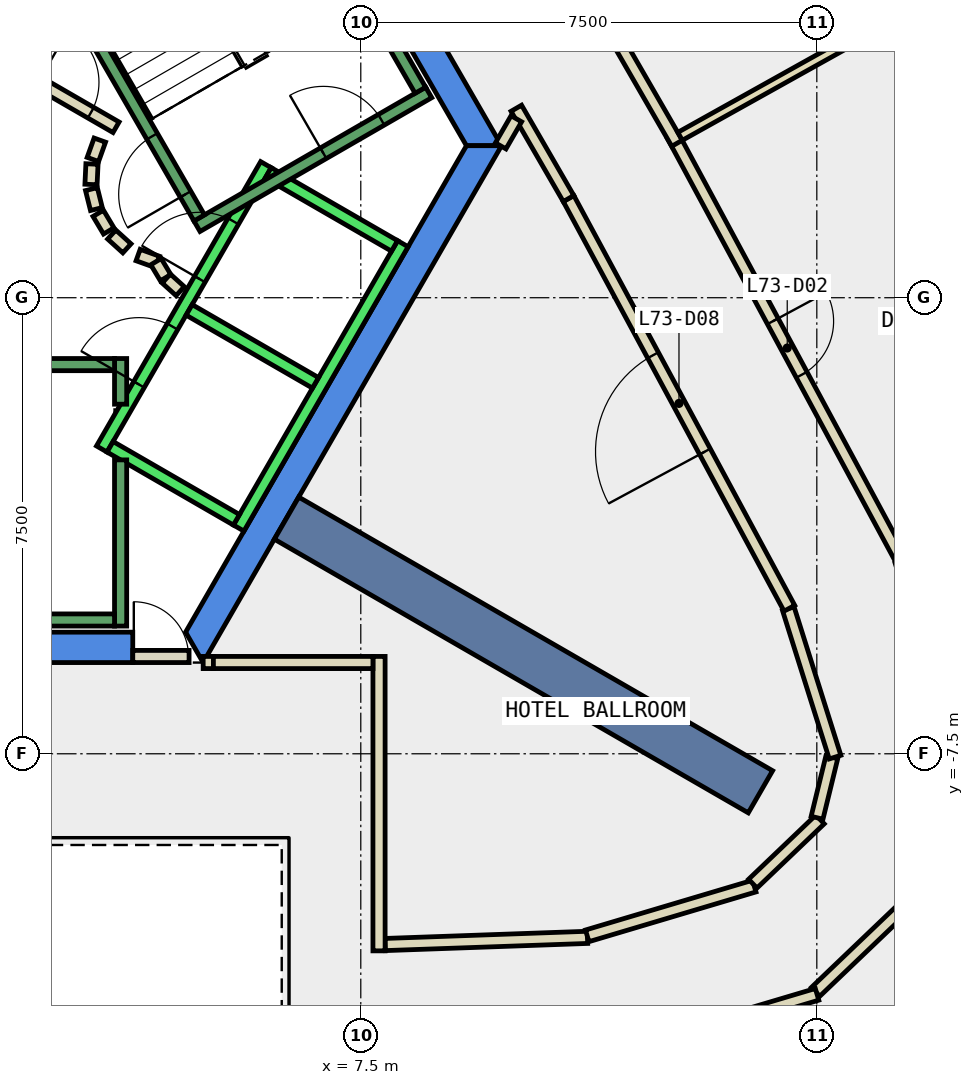
"""IFC4 building model, lengths in metres.
Left out: names, types, materials, properties, quantities, classifications, styles, units other than length and angle.
Written with IfcOpenShell. Run it as: python <this file> out.ifc"""

import sys

from ifc_helpers import new_model, si_unit, direction, frame, frame_2d, origin, place, context, subcontext, project, spatial, polyline, rectangle, outline, extrude, element, fill, save


model = new_model("IFC4")
c1 = context("Model", 3, precision=1e-05, world=origin(), true_north=direction((0.0, 1.0)))
c2 = subcontext(c1, "Body", "Model", "MODEL_VIEW")
j1 = project(units=[si_unit("LENGTHUNIT", "METRE"), si_unit("PLANEANGLEUNIT", "RADIAN")], contexts=[c1])
p1 = place(None, origin())
s1 = spatial("IfcSite", under=j1, at=p1, CompositionType="ELEMENT")
p2 = place(p1, origin())
s2 = spatial("IfcBuilding", under=s1, at=p2, CompositionType="ELEMENT")
p3 = place(p2, frame((0.0, 0.0, 311.6)))
s3 = spatial("IfcBuildingStorey", under=s2, at=p3, CompositionType="ELEMENT", Elevation=311.6)
p4 = place(p3, frame((0.0, 0.0, -0.34)))
e1 = element("IfcWall", 1, at=p4, inside=s3, PredefinedType="SHEAR", context=c2, shape_type="SweptSolid", body=[
    extrude(outline(polyline([(5.486, 9.998), (5.053, 9.748), (9.238, 2.5), (9.815, 2.5), (5.486, 9.998)])), origin(), (0.0, 0.0, 1.0), 3.6),
])
p5 = place(p3, frame((0.0, 0.0, -0.34)))
e2 = element("IfcWall", 2, at=p5, inside=s3, PredefinedType="SHEAR", context=c2, shape_type="SweptSolid", body=[
    extrude(outline(polyline([(3.75, -6.0), (3.75, -5.5), (-4.619, -5.5), (-4.907, -6.0), (3.75, -6.0)])), origin(), (0.0, 0.0, 1.0), 3.6),
])
p6 = place(p3, frame((0.0, 0.0, -0.34)))
e3 = element("IfcWall", 3, at=p6, inside=s3, PredefinedType="SHEAR", context=c2, shape_type="SweptSolid", body=[
    extrude(outline(polyline([(4.907, -6.0), (9.815, 2.5), (9.238, 2.5), (4.619, -5.5), (4.907, -6.0)])), origin(), (0.0, 0.0, 1.0), 3.6),
])
p7 = place(p3, frame((6.279, -3.625, -0.34), z_axis=(0.0, 0.0, 1.0), x_axis=(0.866017533419, -0.500013631625, 0.0)))
e4 = element("IfcWall", 4, at=p7, inside=s3, PredefinedType="SHEAR", context=c2, shape_type="SweptSolid", body=[
    extrude(rectangle(XDim=9.0, YDim=0.8, at=frame_2d((4.5, 0.0))), origin(), (0.0, 0.0, 1.0), 3.6),
])
p8 = place(p3, frame((7.9, -10.637, 0.0), z_axis=(0.0, 0.0, 1.0), x_axis=(0.999372900517, 0.035409119054, 0.0)))
e5 = element("IfcWall", 5, at=p8, inside=s3, PredefinedType="PARTITIONING", context=c2, shape_type="SweptSolid", body=[
    extrude(rectangle(XDim=3.33, YDim=0.2, at=frame_2d((1.665, 0.0))), origin(), (0.0, 0.0, 1.0), 3.26),
])
p9 = place(p3, frame((11.224, -10.494, 0.0), z_axis=(0.0, 0.0, 1.0), x_axis=(0.958417413979, 0.285370041492, 0.0)))
e6 = element("IfcWall", 6, at=p9, inside=s3, PredefinedType="PARTITIONING", context=c2, shape_type="SweptSolid", body=[
    extrude(rectangle(XDim=2.866, YDim=0.2, at=frame_2d((1.433, 0.0))), origin(), (0.0, 0.0, 1.0), 3.26),
])
p10 = place(p3, frame((13.947, -9.636, 0.0), z_axis=(0.0, 0.0, 1.0), x_axis=(0.723283043556, 0.690551691696, 0.0)))
e7 = element("IfcWall", 7, at=p10, inside=s3, PredefinedType="PARTITIONING", context=c2, shape_type="SweptSolid", body=[
    extrude(rectangle(XDim=1.529, YDim=0.2, at=frame_2d((0.765, 0.0))), origin(), (0.0, 0.0, 1.0), 3.26),
])
p11 = place(p3, frame((15.004, -8.552, 0.0), z_axis=(0.0, 0.0, 1.0), x_axis=(0.237373129266, 0.971418549083, 0.0)))
e8 = element("IfcWall", 8, at=p11, inside=s3, PredefinedType="PARTITIONING", context=c2, shape_type="SweptSolid", body=[
    extrude(rectangle(XDim=1.024, YDim=0.2, at=frame_2d((0.512, 0.0))), origin(), (0.0, 0.0, 1.0), 3.26),
])
p12 = place(p3, frame((15.3, -7.555, 0.0), z_axis=(0.0, 0.0, 1.0), x_axis=(-0.300501248013, 0.953781421471, 0.0)))
e9 = element("IfcWall", 9, at=p12, inside=s3, PredefinedType="PARTITIONING", context=c2, shape_type="SweptSolid", body=[
    extrude(rectangle(XDim=2.559, YDim=0.2, at=frame_2d((1.28, 0.0))), origin(), (0.0, 0.0, 1.0), 3.26),
])
p13 = place(p3, frame((14.549, -5.107, 0.0), z_axis=(0.0, 0.0, 1.0), x_axis=(-0.47449538478, 0.880257990491, 0.0)))
e10 = element("IfcWall", 10, at=p13, inside=s3, PredefinedType="PARTITIONING", context=c2, shape_type="SweptSolid", body=[
    extrude(rectangle(XDim=7.655, YDim=0.2, at=frame_2d((3.827, 0.0))), origin(), (0.0, 0.0, 1.0), 3.26),
])
p14 = place(p13, frame((2.927, 0.0, 0.0)))
e11 = element("IfcOpeningElement", 11, at=p14, cuts=e10, PredefinedType="OPENING", context=c2, shape_type="SweptSolid", body=[
    extrude(rectangle(XDim=1.8, YDim=2.1, at=frame_2d((0.9, 1.05))), frame((0.0, 0.11, 0.0), z_axis=(0.0, -1.0, 0.0), x_axis=(1.0, 0.0, 0.0)), (0.0, 0.0, 1.0), 0.22),
])
p15 = place(p3, frame((10.917, 1.631, 0.0), z_axis=(0.0, 0.0, 1.0), x_axis=(-0.500699613169, 0.865621104972, 0.0)))
e12 = element("IfcWall", 12, at=p15, inside=s3, PredefinedType="PARTITIONING", context=c2, shape_type="SweptSolid", body=[
    extrude(rectangle(XDim=1.715, YDim=0.2, at=frame_2d((0.858, 0.0))), origin(), (0.0, 0.0, 1.0), 3.26),
])
p16 = place(p3, frame((10.058, 2.943, 0.0), z_axis=(0.0, 0.0, 1.0), x_axis=(-0.499352927503, -0.866398669086, 0.0)))
e13 = element("IfcWall", 13, at=p16, inside=s3, PredefinedType="PARTITIONING", context=c2, shape_type="SweptSolid", body=[
    extrude(rectangle(XDim=0.515, YDim=0.2, at=frame_2d((0.257, 0.0))), origin(), (0.0, 0.0, 1.0), 3.26),
])
p17 = place(p3, frame((12.628, 2.671, 0.0), z_axis=(0.0, 0.0, 1.0), x_axis=(0.474489967676, -0.880260910512, 0.0)))
e14 = element("IfcWall", 14, at=p17, inside=s3, PredefinedType="PARTITIONING", context=c2, shape_type="SweptSolid", body=[
    extrude(rectangle(XDim=7.948, YDim=0.2, at=frame_2d((3.974, 0.0))), origin(), (0.0, 0.0, 1.0), 3.26),
])
p18 = place(p17, frame((3.474, 0.0, 0.0)))
e15 = element("IfcOpeningElement", 15, at=p18, cuts=e14, PredefinedType="OPENING", context=c2, shape_type="SweptSolid", body=[
    extrude(rectangle(XDim=1.0, YDim=2.1, at=frame_2d((0.5, 1.05))), frame((0.0, 0.11, 0.0), z_axis=(0.0, -1.0, 0.0), x_axis=(1.0, 0.0, 0.0)), (0.0, 0.0, 1.0), 0.22),
])
p19 = place(p3, frame((16.857, -9.622, 0.0), z_axis=(0.0, 0.0, 1.0), x_axis=(-0.723099256445, -0.690744138831, 0.0)))
e16 = element("IfcWall", 16, at=p19, inside=s3, PredefinedType="PARTITIONING", context=c2, shape_type="SweptSolid", body=[
    extrude(rectangle(XDim=2.596, YDim=0.2, at=frame_2d((1.298, 0.0))), origin(), (0.0, 0.0, 1.0), 3.26),
])
p20 = place(p3, frame((15.004, -11.456, 0.0), z_axis=(0.0, 0.0, 1.0), x_axis=(-0.958459796003, -0.285227662485, 0.0)))
e17 = element("IfcWall", 17, at=p20, inside=s3, PredefinedType="PARTITIONING", context=c2, shape_type="SweptSolid", body=[
    extrude(rectangle(XDim=3.604, YDim=0.2, at=frame_2d((1.802, 0.0))), origin(), (0.0, 0.0, 1.0), 3.26),
])
p21 = place(p3, frame((8.588, 9.665, 0.0), z_axis=(0.0, 0.0, 1.0), x_axis=(0.499946799636, -0.86605611685, 0.0)))
e18 = element("IfcWall", 18, at=p21, inside=s3, PredefinedType="PARTITIONING", context=c2, shape_type="SweptSolid", body=[
    extrude(rectangle(XDim=8.227, YDim=0.2, at=frame_2d((4.114, 0.0))), origin(), (0.0, 0.0, 1.0), 3.26),
])
p22 = place(p21, frame((3.613, 0.0, 0.0)))
e19 = element("IfcOpeningElement", 19, at=p22, cuts=e18, PredefinedType="OPENING", context=c2, shape_type="SweptSolid", body=[
    extrude(rectangle(XDim=1.0, YDim=2.1, at=frame_2d((0.5, 1.05))), frame((0.0, 0.11, 0.0), z_axis=(0.0, -1.0, 0.0), x_axis=(1.0, 0.0, 0.0)), (0.0, 0.0, 1.0), 0.22),
])
p23 = place(p3, frame((1.866, 3.732, 0.0), z_axis=(0.0, 0.0, 1.0), x_axis=(0.866043361281, -0.499968895414, 0.0)))
e20 = element("IfcWall", 20, at=p23, inside=s3, PredefinedType="PARTITIONING", context=c2, shape_type="SweptSolid", body=[
    extrude(rectangle(XDim=1.858, YDim=0.2, at=frame_2d((0.929, 0.0))), origin(), (0.0, 0.0, 1.0), 3.26),
])
p24 = place(p23, frame((0.379, 0.0, 0.0)))
e21 = element("IfcOpeningElement", 21, at=p24, cuts=e20, PredefinedType="OPENING", context=c2, shape_type="SweptSolid", body=[
    extrude(rectangle(XDim=1.0, YDim=2.1, at=frame_2d((0.5, 1.05))), frame((0.0, 0.11, 0.0), z_axis=(0.0, -1.0, 0.0), x_axis=(1.0, 0.0, 0.0)), (0.0, 0.0, 1.0), 0.22),
])
p25 = place(p3, frame((3.208, 2.592, 0.0), z_axis=(0.0, 0.0, 1.0), x_axis=(-0.337388820924, -0.941365382578, 0.0)))
e22 = element("IfcWall", 22, at=p25, inside=s3, PredefinedType="PARTITIONING", context=c2, shape_type="SweptSolid", body=[
    extrude(rectangle(XDim=0.338, YDim=0.2, at=frame_2d((0.169, 0.0))), origin(), (0.0, 0.0, 1.0), 3.26),
])
p26 = place(p3, frame((3.079, 2.199, 0.0), z_axis=(0.0, 0.0, 1.0), x_axis=(-0.047771483479, -0.998858290933, 0.0)))
e23 = element("IfcWall", 23, at=p26, inside=s3, PredefinedType="PARTITIONING", context=c2, shape_type="SweptSolid", body=[
    extrude(rectangle(XDim=0.337, YDim=0.2, at=frame_2d((0.169, 0.0))), origin(), (0.0, 0.0, 1.0), 3.26),
])
p27 = place(p3, frame((3.07, 1.786, 0.0), z_axis=(0.0, 0.0, 1.0), x_axis=(0.242705583207, -0.970099994784, 0.0)))
e24 = element("IfcWall", 24, at=p27, inside=s3, PredefinedType="PARTITIONING", context=c2, shape_type="SweptSolid", body=[
    extrude(rectangle(XDim=0.338, YDim=0.2, at=frame_2d((0.169, 0.0))), origin(), (0.0, 0.0, 1.0), 3.26),
])
for number, where, z_axis, x_axis in (
    (25, (3.182, 1.388, 0.0), (0.0, 0.0, 1.0), (0.512, -0.859, 0.0)),
    (26, (3.404, 1.039, 0.0), (0.0, 0.0, 1.0), (0.74, -0.672, 0.0)),
):
    element("IfcWall", number, at=place(p3, frame(where, z_axis=z_axis, x_axis=x_axis)), inside=s3, PredefinedType="PARTITIONING", context=c2, shape_type="SweptSolid", body=[
        extrude(rectangle(XDim=0.338, YDim=0.2, at=frame_2d((0.169, 0.0))), origin(), (0.0, 0.0, 1.0), 3.26),
    ])
p28 = place(p3, frame((3.838, 0.702, 0.0), z_axis=(0.0, 0.0, 1.0), x_axis=(0.941035081519, -0.338308993895, 0.0)))
e27 = element("IfcWall", 27, at=p28, inside=s3, PredefinedType="PARTITIONING", context=c2, shape_type="SweptSolid", body=[
    extrude(rectangle(XDim=0.337, YDim=0.2, at=frame_2d((0.168, 0.0))), origin(), (0.0, 0.0, 1.0), 3.26),
])
p29 = place(p3, frame((4.132, 0.593, 0.0), z_axis=(0.0, 0.0, 1.0), x_axis=(0.513561617048, -0.858052717201, 0.0)))
e28 = element("IfcWall", 28, at=p29, inside=s3, PredefinedType="PARTITIONING", context=c2, shape_type="SweptSolid", body=[
    extrude(rectangle(XDim=0.308, YDim=0.2, at=frame_2d((0.154, 0.0))), origin(), (0.0, 0.0, 1.0), 3.26),
])
p30 = place(p3, frame((4.301, 0.315, 0.0), z_axis=(0.0, 0.0, 1.0), x_axis=(0.741798017506, -0.670623367639, 0.0)))
e29 = element("IfcWall", 29, at=p30, inside=s3, PredefinedType="PARTITIONING", context=c2, shape_type="SweptSolid", body=[
    extrude(rectangle(XDim=0.309, YDim=0.2, at=frame_2d((0.154, 0.0))), origin(), (0.0, 0.0, 1.0), 3.26),
])
p31 = place(p3, frame((4.908, -5.999, 0.0), z_axis=(0.0, 0.0, 1.0), x_axis=(1.0, 0.0, 0.0)))
e30 = element("IfcWall", 30, at=p31, inside=s3, PredefinedType="PARTITIONING", context=c2, shape_type="SweptSolid", body=[
    extrude(rectangle(XDim=0.168, YDim=0.2, at=frame_2d((0.084, 0.0))), origin(), (0.0, 0.0, 1.0), 2.4),
])
p32 = place(p3, frame((7.8, -5.899, 0.0), z_axis=(0.0, 0.0, 1.0), x_axis=(0.0, -1.0, 0.0)))
e31 = element("IfcWall", 31, at=p32, inside=s3, PredefinedType="PARTITIONING", context=c2, shape_type="SweptSolid", body=[
    extrude(rectangle(XDim=4.842, YDim=0.2, at=frame_2d((2.421, 0.0))), origin(), (0.0, 0.0, 1.0), 3.26),
])
p33 = place(p3, frame((12.751, 2.654, 0.0), z_axis=(0.0, 0.0, 1.0), x_axis=(0.873277679945, 0.487222837837, 0.0)))
e32 = element("IfcWall", 32, at=p33, inside=s3, PredefinedType="PARTITIONING", context=c2, shape_type="SweptSolid", body=[
    extrude(rectangle(XDim=4.38, YDim=0.15, at=frame_2d((2.19, 0.0))), origin(), (0.0, 0.0, 1.0), 3.26),
])
p34 = place(p3, frame((3.75, -5.9, 0.0), z_axis=(0.0, 0.0, 1.0), x_axis=(1.0, 0.0, 0.0)))
e33 = element("IfcWall", 33, at=p34, inside=s3, PredefinedType="PARTITIONING", context=c2, shape_type="SweptSolid", body=[
    extrude(rectangle(XDim=0.926, YDim=0.2, at=frame_2d((0.463, 0.0))), origin(), (0.0, 0.0, 1.0), 2.4),
])
p35 = place(p34, frame((0.017, 0.0, 0.0)))
e34 = element("IfcOpeningElement", 34, at=p35, cuts=e33, PredefinedType="OPENING", context=c2, shape_type="SweptSolid", body=[
    extrude(rectangle(XDim=0.9, YDim=2.1, at=frame_2d((0.45, 1.05))), frame((0.0, 0.11, 0.0), z_axis=(0.0, -1.0, 0.0), x_axis=(1.0, 0.0, 0.0)), (0.0, 0.0, 1.0), 0.22),
])
p36 = place(p3, frame((5.076, -5.999, 0.0), z_axis=(0.0, 0.0, 1.0), x_axis=(1.0, 0.0, 0.0)))
e35 = element("IfcWall", 35, at=p36, inside=s3, PredefinedType="PARTITIONING", context=c2, shape_type="SweptSolid", body=[
    extrude(rectangle(XDim=2.624, YDim=0.2, at=frame_2d((1.312, 0.0))), origin(), (0.0, 0.0, 1.0), 3.26),
])
p37 = place(p3, frame((3.24, -2.488, 0.0), z_axis=(0.0, 0.0, 1.0), x_axis=(0.500034260056, 0.866005622828, 0.0)))
e36 = element("IfcWall", 36, at=p37, inside=s3, PredefinedType="STANDARD", context=c2, shape_type="SweptSolid", body=[
    extrude(rectangle(XDim=5.399, YDim=0.2, at=frame_2d((2.7, 0.0))), origin(), (0.0, 0.0, 1.0), 3.26),
])
p38 = place(p37, frame((3.225, 0.0, 0.0)))
e37 = element("IfcOpeningElement", 37, at=p38, cuts=e36, PredefinedType="OPENING", context=c2, shape_type="SweptSolid", body=[
    extrude(rectangle(XDim=1.1, YDim=2.1, at=frame_2d((0.55, 1.05))), frame((0.0, 0.11, 0.0), z_axis=(0.0, -1.0, 0.0), x_axis=(1.0, 0.0, 0.0)), (0.0, 0.0, 1.0), 0.22),
])
p39 = place(p37, frame((1.225, 0.0, 0.0)))
e38 = element("IfcOpeningElement", 38, at=p39, cuts=e36, PredefinedType="OPENING", context=c2, shape_type="SweptSolid", body=[
    extrude(rectangle(XDim=1.1, YDim=2.1, at=frame_2d((0.55, 1.05))), frame((0.0, 0.11, 0.0), z_axis=(0.0, -1.0, 0.0), x_axis=(1.0, 0.0, 0.0)), (0.0, 0.0, 1.0), 0.22),
])
p40 = place(p3, frame((5.492, -3.788, 0.0), z_axis=(0.0, 0.0, 1.0), x_axis=(0.500034260056, 0.866005622828, 0.0)))
e39 = element("IfcWall", 39, at=p40, inside=s3, PredefinedType="STANDARD", context=c2, shape_type="SweptSolid", body=[
    extrude(rectangle(XDim=5.399, YDim=0.2, at=frame_2d((2.7, 0.0))), origin(), (0.0, 0.0, 1.0), 3.26),
])
p41 = place(p3, frame((3.377, -2.452, 0.0), z_axis=(0.0, 0.0, 1.0), x_axis=(0.865955154139, -0.50012165622, 0.0)))
e40 = element("IfcWall", 40, at=p41, inside=s3, PredefinedType="STANDARD", context=c2, shape_type="SweptSolid", body=[
    extrude(rectangle(XDim=2.4, YDim=0.2, at=frame_2d((1.2, 0.0))), origin(), (0.0, 0.0, 1.0), 3.26),
])
for number, where, z_axis, x_axis in (
    (41, (4.677, -0.2, 0.0), (0.0, 0.0, 1.0), (0.866, -0.5, 0.0)),
    (42, (5.977, 2.052, 0.0), (0.0, 0.0, 1.0), (0.866, -0.5, 0.0)),
):
    element("IfcWall", number, at=place(p3, frame(where, z_axis=z_axis, x_axis=x_axis)), inside=s3, PredefinedType="STANDARD", context=c2, shape_type="SweptSolid", body=[
        extrude(rectangle(XDim=2.399, YDim=0.2, at=frame_2d((1.2, 0.0))), origin(), (0.0, 0.0, 1.0), 3.26),
    ])
p42 = place(p3, frame((3.55, -2.667, 0.0), z_axis=(0.0, 0.0, 1.0), x_axis=(0.0, -1.0, 0.0)))
e43 = element("IfcWall", 43, at=p42, inside=s3, PredefinedType="STANDARD", context=c2, shape_type="SweptSolid", body=[
    extrude(rectangle(XDim=2.733, YDim=0.2, at=frame_2d((1.366, 0.0))), origin(), (0.0, 0.0, 1.0), 3.26),
])
p43 = place(p3, frame((3.55, -1.0, 0.0), z_axis=(0.0, 0.0, 1.0), x_axis=(0.0, -1.0, 0.0)))
e44 = element("IfcWall", 44, at=p43, inside=s3, PredefinedType="STANDARD", context=c2, shape_type="SweptSolid", body=[
    extrude(rectangle(XDim=0.751, YDim=0.2, at=frame_2d((0.375, 0.0))), origin(), (0.0, 0.0, 1.0), 3.26),
])
p44 = place(p3, frame((-3.45, -1.1, 0.0), z_axis=(0.0, 0.0, 1.0), x_axis=(1.0, 0.0, 0.0)))
e45 = element("IfcWall", 45, at=p44, inside=s3, PredefinedType="STANDARD", context=c2, shape_type="SweptSolid", body=[
    extrude(rectangle(XDim=6.9, YDim=0.2, at=frame_2d((3.45, 0.0))), origin(), (0.0, 0.0, 1.0), 3.26),
])
p45 = place(p44, frame((0.45, 0.0, 0.0)))
e46 = element("IfcOpeningElement", 46, at=p45, cuts=e45, PredefinedType="OPENING", context=c2, shape_type="SweptSolid", body=[
    extrude(rectangle(XDim=1.1, YDim=2.2, at=frame_2d((0.55, 1.1))), frame((0.0, 0.11, 0.0), z_axis=(0.0, -1.0, 0.0), x_axis=(1.0, 0.0, 0.0)), (0.0, 0.0, 1.0), 0.22),
])
p46 = place(p3, frame((-3.45, -5.3, 0.0), z_axis=(0.0, 0.0, 1.0), x_axis=(1.0, 0.0, 0.0)))
e47 = element("IfcWall", 47, at=p46, inside=s3, PredefinedType="STANDARD", context=c2, shape_type="SweptSolid", body=[
    extrude(rectangle(XDim=6.9, YDim=0.2, at=frame_2d((3.45, 0.0))), origin(), (0.0, 0.0, 1.0), 3.26),
])
p47 = place(p3, frame((4.806, 1.176, 0.0), z_axis=(0.0, 0.0, 1.0), x_axis=(0.866059941101, 0.499940174841, 0.0)))
e48 = element("IfcWall", 48, at=p47, inside=s3, PredefinedType="STANDARD", context=c2, shape_type="SweptSolid", body=[
    extrude(rectangle(XDim=4.4, YDim=0.2, at=frame_2d((2.2, 0.0))), origin(), (0.0, 0.0, 1.0), 3.26),
])
p48 = place(p47, frame((2.4, 0.0, 0.0)))
e49 = element("IfcOpeningElement", 49, at=p48, cuts=e48, PredefinedType="OPENING", context=c2, shape_type="SweptSolid", body=[
    extrude(rectangle(XDim=1.1, YDim=2.2, at=frame_2d((0.55, 1.1))), frame((0.0, 0.11, 0.0), z_axis=(0.0, -1.0, 0.0), x_axis=(1.0, 0.0, 0.0)), (0.0, 0.0, 1.0), 0.22),
])
p49 = place(p3, frame((4.843, 1.312, 0.0), z_axis=(0.0, 0.0, 1.0), x_axis=(-0.499963383562, 0.866046543262, 0.0)))
e50 = element("IfcWall", 50, at=p49, inside=s3, PredefinedType="STANDARD", context=c2, shape_type="SweptSolid", body=[
    extrude(rectangle(XDim=6.9, YDim=0.2, at=frame_2d((3.45, 0.0))), origin(), (0.0, 0.0, 1.0), 3.26),
])
p50 = place(p49, frame((0.45, 0.0, 0.0)))
e51 = element("IfcOpeningElement", 51, at=p50, cuts=e50, PredefinedType="OPENING", context=c2, shape_type="SweptSolid", body=[
    extrude(rectangle(XDim=1.1, YDim=2.2, at=frame_2d((0.55, 1.1))), frame((0.0, 0.11, 0.0), z_axis=(0.0, -1.0, 0.0), x_axis=(1.0, 0.0, 0.0)), (0.0, 0.0, 1.0), 0.22),
])
p51 = place(p3, frame((8.48, 3.412, 0.0), z_axis=(0.0, 0.0, 1.0), x_axis=(-0.499978703459, 0.866037698999, 0.0)))
e52 = element("IfcWall", 52, at=p51, inside=s3, PredefinedType="STANDARD", context=c2, shape_type="SweptSolid", body=[
    extrude(rectangle(XDim=6.9, YDim=0.2, at=frame_2d((3.45, 0.0))), origin(), (0.0, 0.0, 1.0), 3.26),
])
p52 = place(p18, origin())
e53 = element("IfcDoor", 53, at=p52, inside=s3, OperationType="SINGLE_SWING_LEFT", PredefinedType="DOOR", context=c2, shape_type="SweptSolid", body=[
    extrude(rectangle(XDim=1.0, YDim=2.1, at=frame_2d((0.5, 1.05))), frame((0.0, 0.025, 0.0), z_axis=(0.0, -1.0, 0.0), x_axis=(1.0, 0.0, 0.0)), (0.0, 0.0, 1.0), 0.05),
])
fill(e15, e53)
p53 = place(p14, origin())
e54 = element("IfcDoor", 54, at=p53, inside=s3, OperationType="DOUBLE_DOOR_SINGLE_SWING", PredefinedType="DOOR", context=c2, shape_type="SweptSolid", body=[
    extrude(rectangle(XDim=1.8, YDim=2.1, at=frame_2d((0.9, 1.05))), frame((0.0, 0.025, 0.0), z_axis=(0.0, -1.0, 0.0), x_axis=(1.0, 0.0, 0.0)), (0.0, 0.0, 1.0), 0.05),
])
fill(e11, e54)
p54 = place(p24, origin())
e55 = element("IfcDoor", 55, at=p54, inside=s3, OperationType="SINGLE_SWING_LEFT", PredefinedType="DOOR", context=c2, shape_type="SweptSolid", body=[
    extrude(rectangle(XDim=1.0, YDim=2.1, at=frame_2d((0.5, 1.05))), frame((0.0, 0.025, 0.0), z_axis=(0.0, -1.0, 0.0), x_axis=(1.0, 0.0, 0.0)), (0.0, 0.0, 1.0), 0.05),
])
fill(e21, e55)
p55 = place(p35, origin())
e56 = element("IfcDoor", 56, at=p55, inside=s3, OperationType="SINGLE_SWING_LEFT", PredefinedType="DOOR", context=c2, shape_type="SweptSolid", body=[
    extrude(rectangle(XDim=0.9, YDim=2.1, at=frame_2d((0.45, 1.05))), frame((0.0, 0.025, 0.0), z_axis=(0.0, -1.0, 0.0), x_axis=(1.0, 0.0, 0.0)), (0.0, 0.0, 1.0), 0.05),
])
fill(e34, e56)
p56 = place(p38, origin())
e57 = element("IfcDoor", 57, at=p56, inside=s3, OperationType="SLIDING_TO_LEFT", PredefinedType="DOOR", context=c2, shape_type="SweptSolid", body=[
    extrude(rectangle(XDim=1.1, YDim=2.1, at=frame_2d((0.55, 1.05))), frame((0.0, 0.025, 0.0), z_axis=(0.0, -1.0, 0.0), x_axis=(1.0, 0.0, 0.0)), (0.0, 0.0, 1.0), 0.05),
])
fill(e37, e57)
p57 = place(p39, origin())
e58 = element("IfcDoor", 58, at=p57, inside=s3, OperationType="SLIDING_TO_LEFT", PredefinedType="DOOR", context=c2, shape_type="SweptSolid", body=[
    extrude(rectangle(XDim=1.1, YDim=2.1, at=frame_2d((0.55, 1.05))), frame((0.0, 0.025, 0.0), z_axis=(0.0, -1.0, 0.0), x_axis=(1.0, 0.0, 0.0)), (0.0, 0.0, 1.0), 0.05),
])
fill(e38, e58)
p58 = place(p50, origin())
e59 = element("IfcDoor", 59, at=p58, inside=s3, OperationType="SINGLE_SWING_LEFT", PredefinedType="DOOR", context=c2, shape_type="SweptSolid", body=[
    extrude(rectangle(XDim=1.1, YDim=2.2, at=frame_2d((0.55, 1.1))), frame((0.0, 0.025, 0.0), z_axis=(0.0, -1.0, 0.0), x_axis=(1.0, 0.0, 0.0)), (0.0, 0.0, 1.0), 0.05),
])
fill(e51, e59)
p59 = place(p48, origin())
e60 = element("IfcDoor", 60, at=p59, inside=s3, OperationType="SINGLE_SWING_LEFT", PredefinedType="DOOR", context=c2, shape_type="SweptSolid", body=[
    extrude(rectangle(XDim=1.1, YDim=2.2, at=frame_2d((0.55, 1.1))), frame((0.0, 0.025, 0.0), z_axis=(0.0, -1.0, 0.0), x_axis=(1.0, 0.0, 0.0)), (0.0, 0.0, 1.0), 0.05),
])
fill(e49, e60)
save(model, sys.argv[1])
